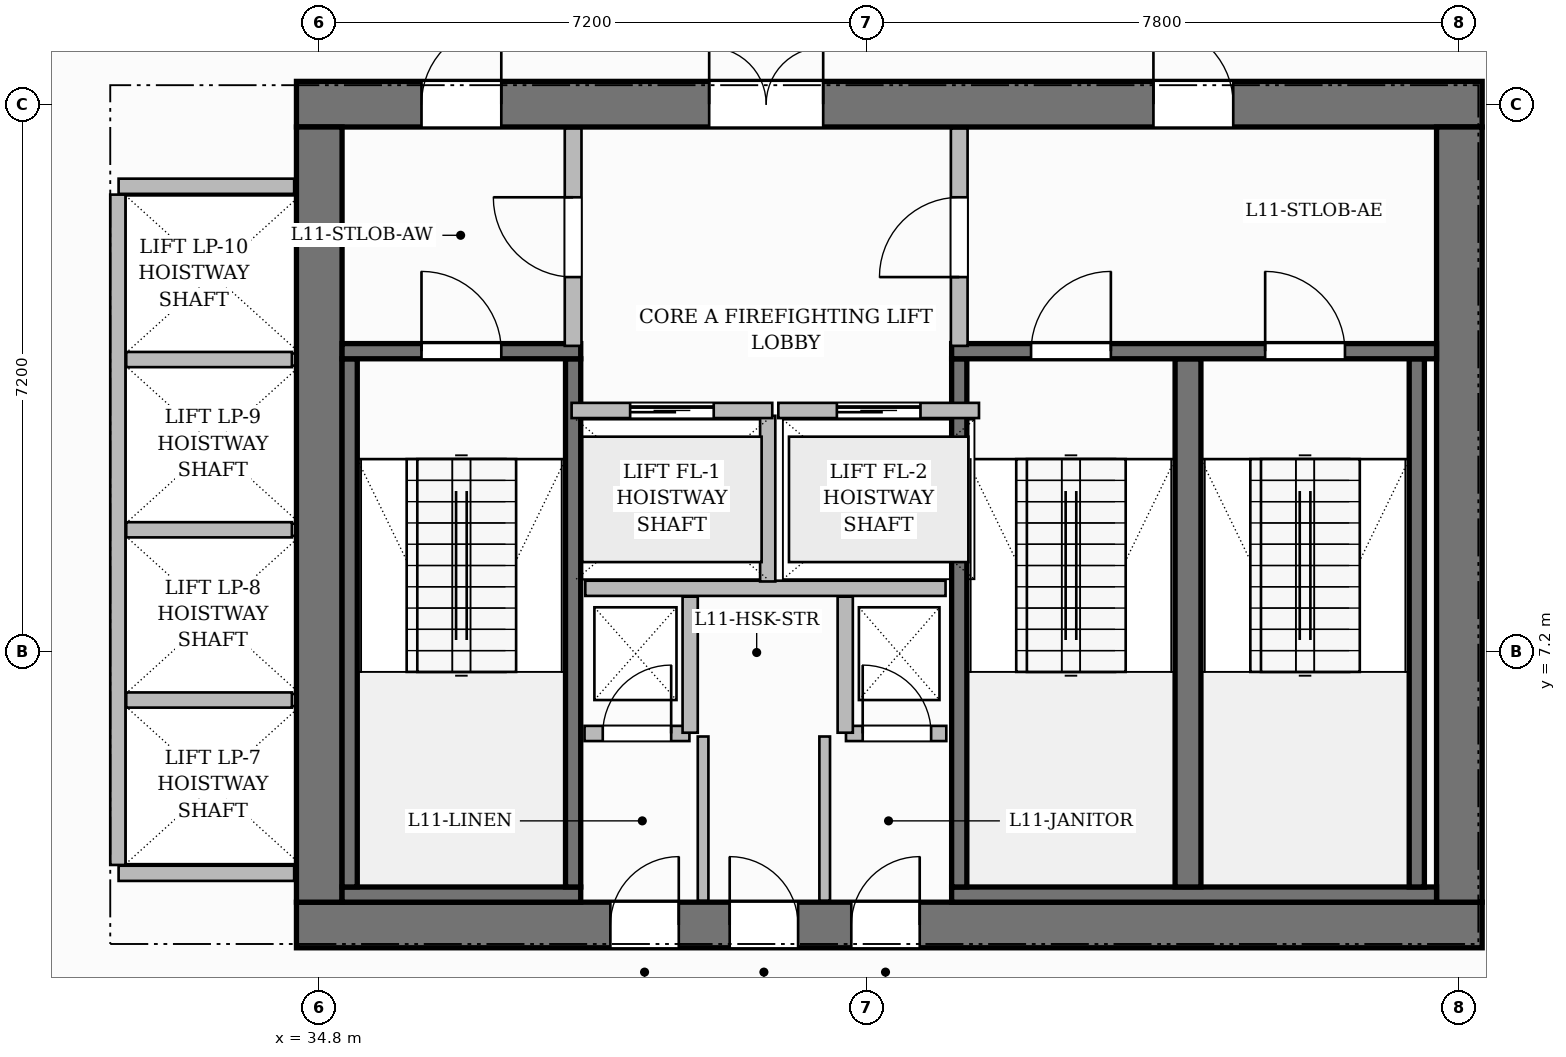
"""IFC4 building model, lengths in metres.
Left out: names, types, materials, properties, quantities, classifications, styles, units other than length and angle.
Written with IfcOpenShell. Run it as: python <this file> out.ifc"""

import sys

from ifc_helpers import new_model, si_unit, direction, frame, frame_2d, origin, place, context, subcontext, project, spatial, rectangle, extrude, source, transform, mapped, element, fill, save


model = new_model("IFC4")
c1 = context("Model", 3, precision=1e-05, world=origin(), true_north=direction((0.0, 1.0)))
c2 = subcontext(c1, "Body", "Model", "MODEL_VIEW")
j1 = project(units=[si_unit("LENGTHUNIT", "METRE"), si_unit("PLANEANGLEUNIT", "RADIAN")], contexts=[c1])
p1 = place(None, origin())
s1 = spatial("IfcSite", under=j1, at=p1, CompositionType="ELEMENT")
p2 = place(p1, origin())
s2 = spatial("IfcBuilding", under=s1, at=p2, CompositionType="ELEMENT")
p3 = place(p2, frame((0.0, 0.0, 50.9)))
s3 = spatial("IfcBuildingStorey", under=s2, at=p3, CompositionType="ELEMENT", Elevation=50.9)
p4 = place(p3, frame((34.5, 3.6, 0.0), z_axis=(0.0, 0.0, 1.0), x_axis=(1.0, 0.0, 0.0)))
e1 = element("IfcWall", 1, at=p4, inside=s3, PredefinedType="SHEAR", context=c2, shape_type="SweptSolid", body=[
    extrude(rectangle(XDim=15.6, YDim=0.6, at=frame_2d((7.8, 0.0))), origin(), (0.0, 0.0, 1.0), 3.7),
])
p5 = place(p4, frame((4.13, 0.0, 0.0)))
e2 = element("IfcOpeningElement", 2, at=p5, cuts=e1, PredefinedType="OPENING", context=c2, shape_type="SweptSolid", body=[
    extrude(rectangle(XDim=0.9, YDim=2.1, at=frame_2d((0.45, 1.05))), frame((0.0, 0.31, 0.0), z_axis=(0.0, -1.0, 0.0), x_axis=(1.0, 0.0, 0.0)), (0.0, 0.0, 1.0), 0.62),
])
p6 = place(p4, frame((5.7, 0.0, 0.0)))
e3 = element("IfcOpeningElement", 3, at=p6, cuts=e1, PredefinedType="OPENING", context=c2, shape_type="SweptSolid", body=[
    extrude(rectangle(XDim=0.9, YDim=2.1, at=frame_2d((0.45, 1.05))), frame((0.0, 0.31, 0.0), z_axis=(0.0, -1.0, 0.0), x_axis=(1.0, 0.0, 0.0)), (0.0, 0.0, 1.0), 0.62),
])
p7 = place(p4, frame((7.3, 0.0, 0.0)))
e4 = element("IfcOpeningElement", 4, at=p7, cuts=e1, PredefinedType="OPENING", context=c2, shape_type="SweptSolid", body=[
    extrude(rectangle(XDim=0.9, YDim=2.1, at=frame_2d((0.45, 1.05))), frame((0.0, 0.31, 0.0), z_axis=(0.0, -1.0, 0.0), x_axis=(1.0, 0.0, 0.0)), (0.0, 0.0, 1.0), 0.62),
])
p8 = place(p3, frame((34.5, 14.4, 0.0), z_axis=(0.0, 0.0, 1.0), x_axis=(1.0, 0.0, 0.0)))
e5 = element("IfcWall", 5, at=p8, inside=s3, PredefinedType="SHEAR", context=c2, shape_type="SweptSolid", body=[
    extrude(rectangle(XDim=15.6, YDim=0.6, at=frame_2d((7.8, 0.0))), origin(), (0.0, 0.0, 1.0), 3.7),
])
p9 = place(p8, frame((5.43, 0.0, 0.0)))
e6 = element("IfcOpeningElement", 6, at=p9, cuts=e5, PredefinedType="OPENING", context=c2, shape_type="SweptSolid", body=[
    extrude(rectangle(XDim=1.5, YDim=2.2, at=frame_2d((0.75, 1.1))), frame((0.0, 0.31, 0.0), z_axis=(0.0, -1.0, 0.0), x_axis=(1.0, 0.0, 0.0)), (0.0, 0.0, 1.0), 0.62),
])
p10 = place(p8, frame((1.645, 0.0, 0.0)))
e7 = element("IfcOpeningElement", 7, at=p10, cuts=e5, PredefinedType="OPENING", context=c2, shape_type="SweptSolid", body=[
    extrude(rectangle(XDim=1.05, YDim=2.15, at=frame_2d((0.525, 1.075))), frame((0.0, 0.31, 0.0), z_axis=(0.0, -1.0, 0.0), x_axis=(1.0, 0.0, 0.0)), (0.0, 0.0, 1.0), 0.62),
])
p11 = place(p8, frame((11.275, 0.0, 0.0)))
e8 = element("IfcOpeningElement", 8, at=p11, cuts=e5, PredefinedType="OPENING", context=c2, shape_type="SweptSolid", body=[
    extrude(rectangle(XDim=1.05, YDim=2.15, at=frame_2d((0.525, 1.075))), frame((0.0, 0.31, 0.0), z_axis=(0.0, -1.0, 0.0), x_axis=(1.0, 0.0, 0.0)), (0.0, 0.0, 1.0), 0.62),
])
for number, where, z_axis, x_axis in (
    (9, (34.8, 3.9, 0.0), (0.0, 0.0, 1.0), (0.0, 1.0, 0.0)),
    (10, (49.8, 3.9, 0.0), (0.0, 0.0, 1.0), (0.0, 1.0, 0.0)),
):
    element("IfcWall", number, at=place(p3, frame(where, z_axis=z_axis, x_axis=x_axis)), inside=s3, PredefinedType="SHEAR", context=c2, shape_type="SweptSolid", body=[
        extrude(rectangle(XDim=10.2, YDim=0.6, at=frame_2d((5.1, 0.0))), origin(), (0.0, 0.0, 1.0), 3.7),
    ])
p12 = place(p3, frame((35.1, 4.0, 0.0), z_axis=(0.0, 0.0, 1.0), x_axis=(1.0, 0.0, 0.0)))
e11 = element("IfcWall", 11, at=p12, inside=s3, PredefinedType="SHEAR", context=c2, shape_type="SweptSolid", body=[
    extrude(rectangle(XDim=3.14, YDim=0.2, at=frame_2d((1.57, 0.0))), origin(), (0.0, 0.0, 1.0), 3.7),
])
for number, where, z_axis, x_axis in (
    (12, (35.2, 4.1, 0.0), (0.0, 0.0, 1.0), (0.0, 1.0, 0.0)),
    (13, (38.14, 4.1, 0.0), (0.0, 0.0, 1.0), (0.0, 1.0, 0.0)),
):
    element("IfcWall", number, at=place(p3, frame(where, z_axis=z_axis, x_axis=x_axis)), inside=s3, PredefinedType="SHEAR", context=c2, shape_type="SweptSolid", body=[
        extrude(rectangle(XDim=6.95, YDim=0.2, at=frame_2d((3.475, 0.0))), origin(), (0.0, 0.0, 1.0), 3.7),
    ])
p13 = place(p3, frame((35.1, 11.15, 0.0), z_axis=(0.0, 0.0, 1.0), x_axis=(1.0, 0.0, 0.0)))
e14 = element("IfcWall", 14, at=p13, inside=s3, PredefinedType="SHEAR", context=c2, shape_type="SweptSolid", body=[
    extrude(rectangle(XDim=3.14, YDim=0.2, at=frame_2d((1.57, 0.0))), origin(), (0.0, 0.0, 1.0), 3.7),
])
p14 = place(p13, frame((1.045, 0.0, 0.0)))
e15 = element("IfcOpeningElement", 15, at=p14, cuts=e14, PredefinedType="OPENING", context=c2, shape_type="SweptSolid", body=[
    extrude(rectangle(XDim=1.05, YDim=2.2, at=frame_2d((0.525, 1.1))), frame((0.0, 0.11, 0.0), z_axis=(0.0, -1.0, 0.0), x_axis=(1.0, 0.0, 0.0)), (0.0, 0.0, 1.0), 0.22),
])
p15 = place(p3, frame((43.12, 4.0, 0.0), z_axis=(0.0, 0.0, 1.0), x_axis=(1.0, 0.0, 0.0)))
e16 = element("IfcWall", 16, at=p15, inside=s3, PredefinedType="SHEAR", context=c2, shape_type="SweptSolid", body=[
    extrude(rectangle(XDim=6.38, YDim=0.2, at=frame_2d((3.19, 0.0))), origin(), (0.0, 0.0, 1.0), 3.7),
])
p16 = place(p3, frame((43.22, 4.1, 0.0), z_axis=(0.0, 0.0, 1.0), x_axis=(0.0, 1.0, 0.0)))
e17 = element("IfcWall", 17, at=p16, inside=s3, PredefinedType="SHEAR", context=c2, shape_type="SweptSolid", body=[
    extrude(rectangle(XDim=6.95, YDim=0.2, at=frame_2d((3.475, 0.0))), origin(), (0.0, 0.0, 1.0), 3.7),
])
p17 = place(p3, frame((46.23, 4.1, 0.0), z_axis=(0.0, 0.0, 1.0), x_axis=(0.0, 1.0, 0.0)))
e18 = element("IfcWall", 18, at=p17, inside=s3, PredefinedType="SHEAR", context=c2, shape_type="SweptSolid", body=[
    extrude(rectangle(XDim=6.95, YDim=0.34, at=frame_2d((3.475, 0.0))), origin(), (0.0, 0.0, 1.0), 3.7),
])
p18 = place(p3, frame((49.24, 4.1, 0.0), z_axis=(0.0, 0.0, 1.0), x_axis=(0.0, 1.0, 0.0)))
e19 = element("IfcWall", 19, at=p18, inside=s3, PredefinedType="SHEAR", context=c2, shape_type="SweptSolid", body=[
    extrude(rectangle(XDim=6.95, YDim=0.2, at=frame_2d((3.475, 0.0))), origin(), (0.0, 0.0, 1.0), 3.7),
])
p19 = place(p3, frame((43.12, 11.15, 0.0), z_axis=(0.0, 0.0, 1.0), x_axis=(1.0, 0.0, 0.0)))
e20 = element("IfcWall", 20, at=p19, inside=s3, PredefinedType="SHEAR", context=c2, shape_type="SweptSolid", body=[
    extrude(rectangle(XDim=6.38, YDim=0.2, at=frame_2d((3.19, 0.0))), origin(), (0.0, 0.0, 1.0), 3.7),
])
p20 = place(p19, frame((1.045, 0.0, 0.0)))
e21 = element("IfcOpeningElement", 21, at=p20, cuts=e20, PredefinedType="OPENING", context=c2, shape_type="SweptSolid", body=[
    extrude(rectangle(XDim=1.05, YDim=2.2, at=frame_2d((0.525, 1.1))), frame((0.0, 0.11, 0.0), z_axis=(0.0, -1.0, 0.0), x_axis=(1.0, 0.0, 0.0)), (0.0, 0.0, 1.0), 0.22),
])
p21 = place(p19, frame((4.125, 0.0, 0.0)))
e22 = element("IfcOpeningElement", 22, at=p21, cuts=e20, PredefinedType="OPENING", context=c2, shape_type="SweptSolid", body=[
    extrude(rectangle(XDim=1.05, YDim=2.2, at=frame_2d((0.525, 1.1))), frame((0.0, 0.11, 0.0), z_axis=(0.0, -1.0, 0.0), x_axis=(1.0, 0.0, 0.0)), (0.0, 0.0, 1.0), 0.22),
])
p22 = place(p3, frame((38.3, 8.03, 0.0), z_axis=(0.0, 0.0, 1.0), x_axis=(1.0, 0.0, 0.0)))
e23 = element("IfcWall", 23, at=p22, inside=s3, PredefinedType="PARTITIONING", context=c2, shape_type="SweptSolid", body=[
    extrude(rectangle(XDim=4.74, YDim=0.2, at=frame_2d((2.37, 0.0))), origin(), (0.0, 0.0, 1.0), 3.45),
])
p23 = place(p3, frame((40.7, 8.12, 0.0), z_axis=(0.0, 0.0, 1.0), x_axis=(0.0, 1.0, 0.0)))
e24 = element("IfcWall", 24, at=p23, inside=s3, PredefinedType="PARTITIONING", context=c2, shape_type="SweptSolid", body=[
    extrude(rectangle(XDim=2.18, YDim=0.2, at=frame_2d((1.09, 0.0))), origin(), (0.0, 0.0, 1.0), 3.45),
])
p24 = place(p3, frame((38.14, 11.22, 0.0), z_axis=(0.0, 0.0, 1.0), x_axis=(0.0, 1.0, 0.0)))
e25 = element("IfcWall", 25, at=p24, inside=s3, PredefinedType="PARTITIONING", context=c2, shape_type="SweptSolid", body=[
    extrude(rectangle(XDim=2.86, YDim=0.22, at=frame_2d((1.43, 0.0))), origin(), (0.0, 0.0, 1.0), 3.45),
])
p25 = place(p24, frame((0.905, 0.0, 0.0)))
e26 = element("IfcOpeningElement", 26, at=p25, cuts=e25, PredefinedType="OPENING", context=c2, shape_type="SweptSolid", body=[
    extrude(rectangle(XDim=1.05, YDim=2.15, at=frame_2d((0.525, 1.075))), frame((0.0, 0.12, 0.0), z_axis=(0.0, -1.0, 0.0), x_axis=(1.0, 0.0, 0.0)), (0.0, 0.0, 1.0), 0.24),
])
p26 = place(p3, frame((43.22, 11.22, 0.0), z_axis=(0.0, 0.0, 1.0), x_axis=(0.0, 1.0, 0.0)))
e27 = element("IfcWall", 27, at=p26, inside=s3, PredefinedType="PARTITIONING", context=c2, shape_type="SweptSolid", body=[
    extrude(rectangle(XDim=2.86, YDim=0.22, at=frame_2d((1.43, 0.0))), origin(), (0.0, 0.0, 1.0), 3.45),
])
p27 = place(p26, frame((0.905, 0.0, 0.0)))
e28 = element("IfcOpeningElement", 28, at=p27, cuts=e27, PredefinedType="OPENING", context=c2, shape_type="SweptSolid", body=[
    extrude(rectangle(XDim=1.05, YDim=2.15, at=frame_2d((0.525, 1.075))), frame((0.0, 0.12, 0.0), z_axis=(0.0, -1.0, 0.0), x_axis=(1.0, 0.0, 0.0)), (0.0, 0.0, 1.0), 0.24),
])
p28 = place(p3, frame((38.29, 6.12, 0.0), z_axis=(0.0, 0.0, 1.0), x_axis=(1.0, 0.0, 0.0)))
e29 = element("IfcWall", 29, at=p28, inside=s3, PredefinedType="PARTITIONING", context=c2, shape_type="SweptSolid", body=[
    extrude(rectangle(XDim=1.38, YDim=0.2, at=frame_2d((0.69, 0.0))), origin(), (0.0, 0.0, 1.0), 3.45),
])
p29 = place(p28, frame((0.24, 0.0, 0.0)))
e30 = element("IfcOpeningElement", 30, at=p29, cuts=e29, PredefinedType="OPENING", context=c2, shape_type="SweptSolid", body=[
    extrude(rectangle(XDim=0.9, YDim=2.1, at=frame_2d((0.45, 1.05))), frame((0.0, 0.11, 0.0), z_axis=(0.0, -1.0, 0.0), x_axis=(1.0, 0.0, 0.0)), (0.0, 0.0, 1.0), 0.22),
])
p30 = place(p3, frame((39.68, 6.13, 0.0), z_axis=(0.0, 0.0, 1.0), x_axis=(0.0, 1.0, 0.0)))
e31 = element("IfcWall", 31, at=p30, inside=s3, PredefinedType="PARTITIONING", context=c2, shape_type="SweptSolid", body=[
    extrude(rectangle(XDim=1.79, YDim=0.2, at=frame_2d((0.895, 0.0))), origin(), (0.0, 0.0, 1.0), 3.45),
])
p31 = place(p3, frame((41.73, 6.12, 0.0), z_axis=(0.0, 0.0, 1.0), x_axis=(1.0, 0.0, 0.0)))
e32 = element("IfcWall", 32, at=p31, inside=s3, PredefinedType="PARTITIONING", context=c2, shape_type="SweptSolid", body=[
    extrude(rectangle(XDim=1.32, YDim=0.2, at=frame_2d((0.66, 0.0))), origin(), (0.0, 0.0, 1.0), 3.45),
])
p32 = place(p31, frame((0.22, 0.0, 0.0)))
e33 = element("IfcOpeningElement", 33, at=p32, cuts=e32, PredefinedType="OPENING", context=c2, shape_type="SweptSolid", body=[
    extrude(rectangle(XDim=0.9, YDim=2.1, at=frame_2d((0.45, 1.05))), frame((0.0, 0.11, 0.0), z_axis=(0.0, -1.0, 0.0), x_axis=(1.0, 0.0, 0.0)), (0.0, 0.0, 1.0), 0.22),
])
p33 = place(p3, frame((41.72, 6.13, 0.0), z_axis=(0.0, 0.0, 1.0), x_axis=(0.0, 1.0, 0.0)))
e34 = element("IfcWall", 34, at=p33, inside=s3, PredefinedType="PARTITIONING", context=c2, shape_type="SweptSolid", body=[
    extrude(rectangle(XDim=1.79, YDim=0.2, at=frame_2d((0.895, 0.0))), origin(), (0.0, 0.0, 1.0), 3.45),
])
for number, where, z_axis, x_axis in (
    (35, (39.85, 3.92, 0.0), (0.0, 0.0, 1.0), (0.0, 1.0, 0.0)),
    (36, (41.45, 3.92, 0.0), (0.0, 0.0, 1.0), (0.0, 1.0, 0.0)),
):
    element("IfcWall", number, at=place(p3, frame(where, z_axis=z_axis, x_axis=x_axis)), inside=s3, PredefinedType="PARTITIONING", context=c2, shape_type="SweptSolid", body=[
        extrude(rectangle(XDim=2.16, YDim=0.14, at=frame_2d((1.08, 0.0))), origin(), (0.0, 0.0, 1.0), 3.45),
    ])
for number, where, z_axis, x_axis in (
    (37, (32.16, 4.28, 0.0), (0.0, 0.0, 1.0), (1.0, 0.0, 0.0)),
    (38, (32.16, 13.32, 0.0), (0.0, 0.0, 1.0), (1.0, 0.0, 0.0)),
):
    element("IfcWall", number, at=place(p3, frame(where, z_axis=z_axis, x_axis=x_axis)), inside=s3, PredefinedType="PARTITIONING", context=c2, shape_type="SweptSolid", body=[
        extrude(rectangle(XDim=2.31, YDim=0.2, at=frame_2d((1.155, 0.0))), origin(), (0.0, 0.0, 1.0), 3.45),
    ])
p34 = place(p3, frame((32.15, 4.39, 0.0), z_axis=(0.0, 0.0, 1.0), x_axis=(0.0, 1.0, 0.0)))
e39 = element("IfcWall", 39, at=p34, inside=s3, PredefinedType="PARTITIONING", context=c2, shape_type="SweptSolid", body=[
    extrude(rectangle(XDim=8.82, YDim=0.2, at=frame_2d((4.41, 0.0))), origin(), (0.0, 0.0, 1.0), 3.45),
])
for number, where, z_axis, x_axis in (
    (40, (32.26, 6.56, 0.0), (0.0, 0.0, 1.0), (1.0, 0.0, 0.0)),
    (41, (32.26, 8.8, 0.0), (0.0, 0.0, 1.0), (1.0, 0.0, 0.0)),
    (42, (32.26, 11.04, 0.0), (0.0, 0.0, 1.0), (1.0, 0.0, 0.0)),
):
    element("IfcWall", number, at=place(p3, frame(where, z_axis=z_axis, x_axis=x_axis)), inside=s3, PredefinedType="PARTITIONING", context=c2, shape_type="SweptSolid", body=[
        extrude(rectangle(XDim=2.18, YDim=0.2, at=frame_2d((1.09, 0.0))), origin(), (0.0, 0.0, 1.0), 3.45),
    ])
p35 = place(p3, frame((38.12, 10.37, 0.0), z_axis=(0.0, 0.0, 1.0), x_axis=(1.0, 0.0, 0.0)))
e43 = element("IfcWall", 43, at=p35, inside=s3, PredefinedType="PARTITIONING", context=c2, shape_type="SweptSolid", body=[
    extrude(rectangle(XDim=2.64, YDim=0.2, at=frame_2d((1.32, 0.0))), origin(), (0.0, 0.0, 1.0), 3.45),
])
p36 = place(p35, frame((0.77, 0.0, 0.0)))
e44 = element("IfcOpeningElement", 44, at=p36, cuts=e43, PredefinedType="OPENING", context=c2, shape_type="SweptSolid", body=[
    extrude(rectangle(XDim=1.1, YDim=2.2, at=frame_2d((0.55, 1.1))), frame((0.0, 0.11, 0.0), z_axis=(0.0, -1.0, 0.0), x_axis=(1.0, 0.0, 0.0)), (0.0, 0.0, 1.0), 0.22),
])
p37 = place(p3, frame((40.84, 10.37, 0.0), z_axis=(0.0, 0.0, 1.0), x_axis=(1.0, 0.0, 0.0)))
e45 = element("IfcWall", 45, at=p37, inside=s3, PredefinedType="PARTITIONING", context=c2, shape_type="SweptSolid", body=[
    extrude(rectangle(XDim=2.64, YDim=0.2, at=frame_2d((1.32, 0.0))), origin(), (0.0, 0.0, 1.0), 3.45),
])
p38 = place(p37, frame((0.77, 0.0, 0.0)))
e46 = element("IfcOpeningElement", 46, at=p38, cuts=e45, PredefinedType="OPENING", context=c2, shape_type="SweptSolid", body=[
    extrude(rectangle(XDim=1.1, YDim=2.2, at=frame_2d((0.55, 1.1))), frame((0.0, 0.11, 0.0), z_axis=(0.0, -1.0, 0.0), x_axis=(1.0, 0.0, 0.0)), (0.0, 0.0, 1.0), 0.22),
])
m1 = source(origin(), c2, "Body", "SweptSolid", [
    extrude(rectangle(XDim=1.05, YDim=2.2, at=frame_2d((0.525, 1.1))), frame((0.0, 0.025, 0.0), z_axis=(0.0, -1.0, 0.0), x_axis=(1.0, 0.0, 0.0)), (0.0, 0.0, 1.0), 0.05),
])
p39 = place(p14, origin())
e47 = element("IfcDoor", 47, at=p39, inside=s3, OperationType="SINGLE_SWING_LEFT", PredefinedType="DOOR", context=c2, shape_type="MappedRepresentation", body=[
    mapped(m1, transform((0.0, 0.0, 0.0), scale=1.0)),
])
fill(e15, e47)
p40 = place(p20, origin())
e48 = element("IfcDoor", 48, at=p40, inside=s3, OperationType="SINGLE_SWING_RIGHT", PredefinedType="DOOR", context=c2, shape_type="MappedRepresentation", body=[
    mapped(m1, transform((0.0, 0.0, 0.0), scale=1.0)),
])
fill(e21, e48)
p41 = place(p21, origin())
e49 = element("IfcDoor", 49, at=p41, inside=s3, OperationType="SINGLE_SWING_LEFT", PredefinedType="DOOR", context=c2, shape_type="MappedRepresentation", body=[
    mapped(m1, transform((0.0, 0.0, 0.0), scale=1.0)),
])
fill(e22, e49)
m2 = source(origin(), c2, "Body", "SweptSolid", [
    extrude(rectangle(XDim=1.05, YDim=2.15, at=frame_2d((0.525, 1.075))), frame((0.0, 0.025, 0.0), z_axis=(0.0, -1.0, 0.0), x_axis=(1.0, 0.0, 0.0)), (0.0, 0.0, 1.0), 0.05),
])
p42 = place(p25, origin())
e50 = element("IfcDoor", 50, at=p42, inside=s3, OperationType="SINGLE_SWING_RIGHT", PredefinedType="DOOR", context=c2, shape_type="MappedRepresentation", body=[
    mapped(m2, transform((0.0, 0.0, 0.0), scale=1.0)),
])
fill(e26, e50)
p43 = place(p27, origin())
e51 = element("IfcDoor", 51, at=p43, inside=s3, OperationType="SINGLE_SWING_LEFT", PredefinedType="DOOR", context=c2, shape_type="MappedRepresentation", body=[
    mapped(m2, transform((0.0, 0.0, 0.0), scale=1.0)),
])
fill(e28, e51)
m3 = source(origin(), c2, "Body", "SweptSolid", [
    extrude(rectangle(XDim=1.5, YDim=2.2, at=frame_2d((0.75, 1.1))), frame((0.0, 0.025, 0.0), z_axis=(0.0, -1.0, 0.0), x_axis=(1.0, 0.0, 0.0)), (0.0, 0.0, 1.0), 0.05),
])
p44 = place(p9, origin())
e52 = element("IfcDoor", 52, at=p44, inside=s3, OperationType="DOUBLE_DOOR_SINGLE_SWING", PredefinedType="DOOR", context=c2, shape_type="MappedRepresentation", body=[
    mapped(m3, transform((0.0, 0.0, 0.0), scale=1.0)),
])
fill(e6, e52)
p45 = place(p10, origin())
e53 = element("IfcDoor", 53, at=p45, inside=s3, OperationType="SINGLE_SWING_RIGHT", PredefinedType="DOOR", context=c2, shape_type="MappedRepresentation", body=[
    mapped(m2, transform((0.0, 0.0, 0.0), scale=1.0)),
])
fill(e7, e53)
p46 = place(p11, origin())
e54 = element("IfcDoor", 54, at=p46, inside=s3, OperationType="SINGLE_SWING_LEFT", PredefinedType="DOOR", context=c2, shape_type="MappedRepresentation", body=[
    mapped(m2, transform((0.0, 0.0, 0.0), scale=1.0)),
])
fill(e8, e54)
m4 = source(origin(), c2, "Body", "SweptSolid", [
    extrude(rectangle(XDim=0.9, YDim=2.1, at=frame_2d((0.45, 1.05))), frame((0.0, 0.025, 0.0), z_axis=(0.0, -1.0, 0.0), x_axis=(1.0, 0.0, 0.0)), (0.0, 0.0, 1.0), 0.05),
])
p47 = place(p29, origin())
e55 = element("IfcDoor", 55, at=p47, inside=s3, OperationType="SINGLE_SWING_RIGHT", PredefinedType="DOOR", context=c2, shape_type="MappedRepresentation", body=[
    mapped(m4, transform((0.0, 0.0, 0.0), scale=1.0)),
])
fill(e30, e55)
p48 = place(p32, origin())
e56 = element("IfcDoor", 56, at=p48, inside=s3, OperationType="SINGLE_SWING_LEFT", PredefinedType="DOOR", context=c2, shape_type="MappedRepresentation", body=[
    mapped(m4, transform((0.0, 0.0, 0.0), scale=1.0)),
])
fill(e33, e56)
p49 = place(p5, origin())
e57 = element("IfcDoor", 57, at=p49, inside=s3, OperationType="SINGLE_SWING_RIGHT", PredefinedType="DOOR", context=c2, shape_type="MappedRepresentation", body=[
    mapped(m4, transform((0.0, 0.0, 0.0), scale=1.0)),
])
fill(e2, e57)
p50 = place(p6, origin())
e58 = element("IfcDoor", 58, at=p50, inside=s3, OperationType="SINGLE_SWING_LEFT", PredefinedType="DOOR", context=c2, shape_type="MappedRepresentation", body=[
    mapped(m4, transform((0.0, 0.0, 0.0), scale=1.0)),
])
fill(e3, e58)
p51 = place(p7, origin())
e59 = element("IfcDoor", 59, at=p51, inside=s3, OperationType="SINGLE_SWING_RIGHT", PredefinedType="DOOR", context=c2, shape_type="MappedRepresentation", body=[
    mapped(m4, transform((0.0, 0.0, 0.0), scale=1.0)),
])
fill(e4, e59)
m5 = source(origin(), c2, "Body", "SweptSolid", [
    extrude(rectangle(XDim=1.1, YDim=2.2, at=frame_2d((0.55, 1.1))), frame((0.0, 0.025, 0.0), z_axis=(0.0, -1.0, 0.0), x_axis=(1.0, 0.0, 0.0)), (0.0, 0.0, 1.0), 0.05),
])
p52 = place(p36, origin())
e60 = element("IfcDoor", 60, at=p52, inside=s3, OperationType="SLIDING_TO_LEFT", PredefinedType="DOOR", context=c2, shape_type="MappedRepresentation", body=[
    mapped(m5, transform((0.0, 0.0, 0.0), scale=1.0)),
])
fill(e44, e60)
p53 = place(p38, origin())
e61 = element("IfcDoor", 61, at=p53, inside=s3, OperationType="SLIDING_TO_LEFT", PredefinedType="DOOR", context=c2, shape_type="MappedRepresentation", body=[
    mapped(m5, transform((0.0, 0.0, 0.0), scale=1.0)),
])
fill(e46, e61)
save(model, sys.argv[1])
